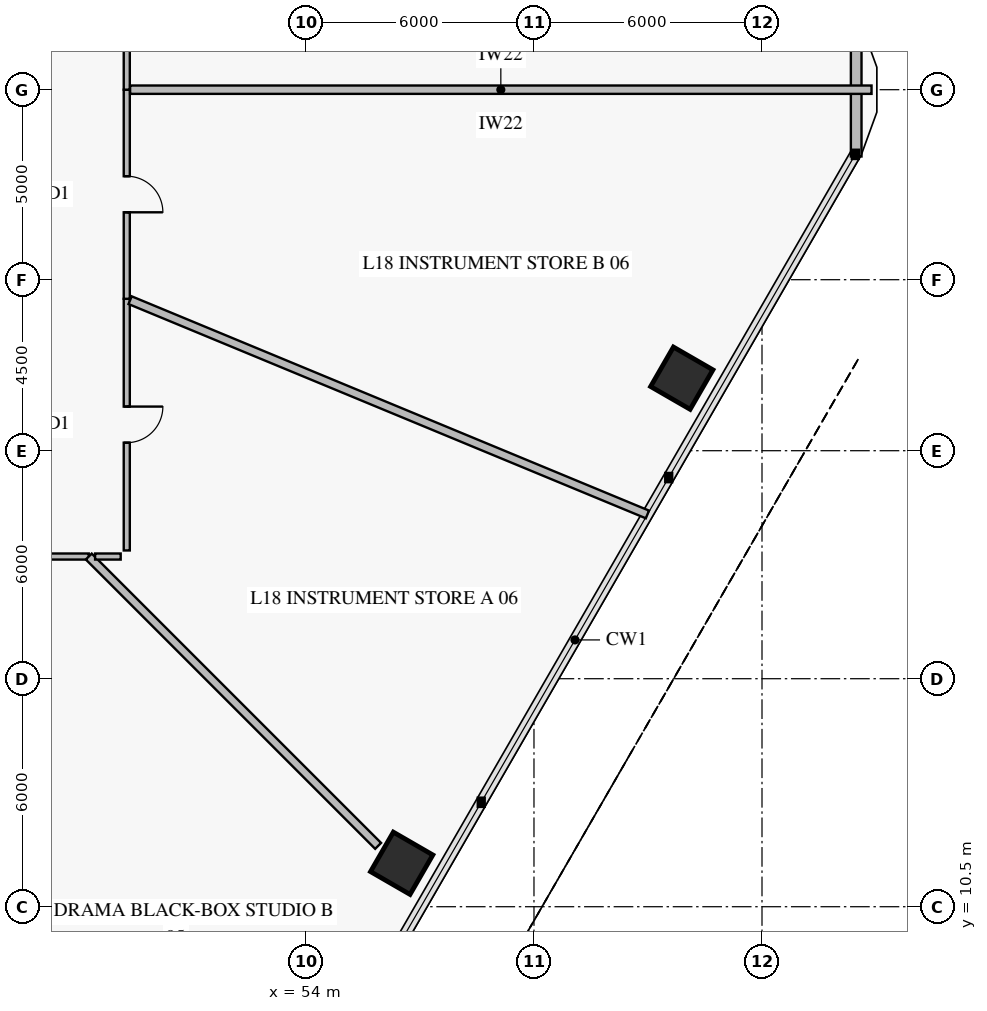
"""IFC4 building model, lengths in metres.
Left out: names, types, materials, properties, quantities, classifications, styles, units other than length and angle.
Written with IfcOpenShell. Run it as: python <this file> out.ifc"""

import sys

from ifc_helpers import new_model, si_unit, direction, frame, frame_2d, origin, origin_2d, place, context, subcontext, project, spatial, rectangle, extrude, element, fill, save


model = new_model("IFC4")
c1 = context("Model", 3, precision=1e-05, world=origin(), true_north=direction((0.0, 1.0)))
c2 = subcontext(c1, "Body", "Model", "MODEL_VIEW")
j1 = project(units=[si_unit("LENGTHUNIT", "METRE"), si_unit("PLANEANGLEUNIT", "RADIAN")], contexts=[c1])
p1 = place(None, origin())
s1 = spatial("IfcSite", under=j1, at=p1, CompositionType="ELEMENT")
p2 = place(p1, origin())
s2 = spatial("IfcBuilding", under=s1, at=p2, CompositionType="ELEMENT")
p3 = place(p2, frame((0.0, 0.0, 75.0)))
s3 = spatial("IfcBuildingStorey", under=s2, at=p3, CompositionType="ELEMENT", Elevation=75.0)
for number, where, z_axis, x_axis in (
    (1, (56.519, 11.643, 0.0), (0.0, 0.0, 1.0), (0.5, 0.866, 0.0)),
    (2, (63.889, 24.408, 0.0), (0.0, 0.0, 1.0), (0.5, 0.866, 0.0)),
):
    element("IfcColumn", number, at=place(p3, frame(where, z_axis=z_axis, x_axis=x_axis)), inside=s3, PredefinedType="COLUMN", context=c2, shape_type="SweptSolid", body=[
        extrude(rectangle(XDim=1.2, YDim=1.2, at=origin_2d()), origin(), (0.0, 0.0, 1.0), 3.92),
    ])
p4 = place(p3, frame((68.479, 33.758, 0.0), z_axis=(0.0, 0.0, 1.0), x_axis=(0.0, -1.0, 0.0)))
e3 = element("IfcWall", 3, at=p4, inside=s3, PredefinedType="SOLIDWALL", context=c2, shape_type="SweptSolid", body=[
    extrude(rectangle(XDim=3.515, YDim=0.28, at=frame_2d((1.758, 0.0))), origin(), (0.0, 0.0, 1.0), 3.92),
])
p5 = place(p3, frame((40.963, 19.715, 0.0), z_axis=(0.0, 0.0, 1.0), x_axis=(1.0, 0.0, 0.0)))
e4 = element("IfcWall", 4, at=p5, inside=s3, PredefinedType="PARTITIONING", context=c2, shape_type="SweptSolid", body=[
    extrude(rectangle(XDim=7.322, YDim=0.16, at=frame_2d((3.661, 0.0))), origin(), (0.0, 0.0, 1.0), 3.22),
])
p6 = place(p5, frame((3.086, 0.0, 0.0)))
e5 = element("IfcOpeningElement", 5, at=p6, cuts=e4, PredefinedType="OPENING", context=c2, shape_type="SweptSolid", body=[
    extrude(rectangle(XDim=1.15, YDim=2.2, at=frame_2d((0.575, 1.1))), frame((0.0, 0.092, 0.0), z_axis=(0.0, -1.0, 0.0), x_axis=(1.0, 0.0, 0.0)), (0.0, 0.0, 1.0), 0.184),
])
p7 = place(p3, frame((49.285, 19.875, 0.0), z_axis=(0.0, 0.0, 1.0), x_axis=(0.0, 1.0, 0.0)))
e6 = element("IfcWall", 6, at=p7, inside=s3, PredefinedType="PARTITIONING", context=c2, shape_type="SweptSolid", body=[
    extrude(rectangle(XDim=6.622, YDim=0.16, at=frame_2d((3.311, 0.0))), origin(), (0.0, 0.0, 1.0), 3.92),
])
p8 = place(p7, frame((2.836, 0.0, 0.0)))
e7 = element("IfcOpeningElement", 7, at=p8, cuts=e6, PredefinedType="OPENING", context=c2, shape_type="SweptSolid", body=[
    extrude(rectangle(XDim=0.95, YDim=2.1, at=frame_2d((0.475, 1.05))), frame((0.0, 0.092, 0.0), z_axis=(0.0, -1.0, 0.0), x_axis=(1.0, 0.0, 0.0)), (0.0, 0.0, 1.0), 0.184),
])
p9 = place(p3, frame((49.285, 26.497, 0.0), z_axis=(0.0, 0.0, 1.0), x_axis=(0.0, 1.0, 0.0)))
e8 = element("IfcWall", 8, at=p9, inside=s3, PredefinedType="PARTITIONING", context=c2, shape_type="SweptSolid", body=[
    extrude(rectangle(XDim=5.503, YDim=0.16, at=frame_2d((2.751, 0.0))), origin(), (0.0, 0.0, 1.0), 3.22),
])
p10 = place(p9, frame((2.276, 0.0, 0.0)))
e9 = element("IfcOpeningElement", 9, at=p10, cuts=e8, PredefinedType="OPENING", context=c2, shape_type="SweptSolid", body=[
    extrude(rectangle(XDim=0.95, YDim=2.1, at=frame_2d((0.475, 1.05))), frame((0.0, 0.092, 0.0), z_axis=(0.0, -1.0, 0.0), x_axis=(1.0, 0.0, 0.0)), (0.0, 0.0, 1.0), 0.184),
])
p11 = place(p3, frame((49.285, 32.0, 0.0), z_axis=(0.0, 0.0, 1.0), x_axis=(0.0, 1.0, 0.0)))
e10 = element("IfcWall", 10, at=p11, inside=s3, PredefinedType="PARTITIONING", context=c2, shape_type="SweptSolid", body=[
    extrude(rectangle(XDim=5.503, YDim=0.16, at=frame_2d((2.751, 0.0))), origin(), (0.0, 0.0, 1.0), 3.22),
])
p12 = place(p11, frame((2.276, 0.0, 0.0)))
e11 = element("IfcOpeningElement", 11, at=p12, cuts=e10, PredefinedType="OPENING", context=c2, shape_type="SweptSolid", body=[
    extrude(rectangle(XDim=0.95, YDim=2.1, at=frame_2d((0.475, 1.05))), frame((0.0, 0.092, 0.0), z_axis=(0.0, -1.0, 0.0), x_axis=(1.0, 0.0, 0.0)), (0.0, 0.0, 1.0), 0.184),
])
p13 = place(p3, frame((40.999, 19.627, 0.0), z_axis=(0.0, 0.0, 1.0), x_axis=(0.374605213306, -0.927184412166, 0.0)))
e12 = element("IfcWall", 12, at=p13, inside=s3, PredefinedType="PARTITIONING", context=c2, shape_type="SweptSolid", body=[
    extrude(rectangle(XDim=17.888, YDim=0.22, at=frame_2d((8.944, 0.0))), origin(), (0.0, 0.0, 1.0), 3.17),
])
p14 = place(p3, frame((48.285, 19.715, 0.0), z_axis=(0.0, 0.0, 1.0), x_axis=(0.707106781187, -0.707106781187, 0.0)))
e13 = element("IfcWall", 13, at=p14, inside=s3, PredefinedType="PARTITIONING", context=c2, shape_type="SweptSolid", body=[
    extrude(rectangle(XDim=10.768, YDim=0.22, at=frame_2d((5.384, 0.0))), origin(), (0.0, 0.0, 1.0), 3.22),
])
p15 = place(p3, frame((49.373, 26.461, 0.0), z_axis=(0.0, 0.0, 1.0), x_axis=(0.923882327997, -0.382676683396, 0.0)))
e14 = element("IfcWall", 14, at=p15, inside=s3, PredefinedType="PARTITIONING", context=c2, shape_type="SweptSolid", body=[
    extrude(rectangle(XDim=14.734, YDim=0.22, at=frame_2d((7.367, 0.0))), origin(), (0.0, 0.0, 1.0), 3.17),
])
p16 = place(p3, frame((48.452, 19.715, 0.0), z_axis=(0.0, 0.0, 1.0), x_axis=(1.0, 0.0, 0.0)))
e15 = element("IfcWall", 15, at=p16, inside=s3, PredefinedType="PARTITIONING", context=c2, shape_type="SweptSolid", body=[
    extrude(rectangle(XDim=0.673, YDim=0.16, at=frame_2d((0.336, 0.0))), origin(), (0.0, 0.0, 1.0), 3.22),
])
p17 = place(p3, frame((49.373, 32.0, 0.0), z_axis=(0.0, 0.0, 1.0), x_axis=(1.0, 0.0, 0.0)))
e16 = element("IfcWall", 16, at=p17, inside=s3, PredefinedType="PARTITIONING", context=c2, shape_type="SweptSolid", body=[
    extrude(rectangle(XDim=19.509, YDim=0.22, at=frame_2d((9.755, 0.0))), origin(), (0.0, 0.0, 1.0), 3.17),
])
p18 = place(p8, frame((0.95, 0.0, 0.0), z_axis=(0.0, 0.0, 1.0), x_axis=(-1.0, 0.0, 0.0)))
e17 = element("IfcDoor", 17, at=p18, inside=s3, OperationType="SINGLE_SWING_LEFT", PredefinedType="DOOR", context=c2, shape_type="SweptSolid", body=[
    extrude(rectangle(XDim=0.95, YDim=2.1, at=frame_2d((0.475, 1.05))), frame((0.0, 0.025, 0.0), z_axis=(0.0, -1.0, 0.0), x_axis=(1.0, 0.0, 0.0)), (0.0, 0.0, 1.0), 0.05),
])
fill(e7, e17)
p19 = place(p10, frame((0.95, 0.0, 0.0), z_axis=(0.0, 0.0, 1.0), x_axis=(-1.0, 0.0, 0.0)))
e18 = element("IfcDoor", 18, at=p19, inside=s3, OperationType="SINGLE_SWING_RIGHT", PredefinedType="DOOR", context=c2, shape_type="SweptSolid", body=[
    extrude(rectangle(XDim=0.95, YDim=2.1, at=frame_2d((0.475, 1.05))), frame((0.0, 0.025, 0.0), z_axis=(0.0, -1.0, 0.0), x_axis=(1.0, 0.0, 0.0)), (0.0, 0.0, 1.0), 0.05),
])
fill(e9, e18)
save(model, sys.argv[1])
